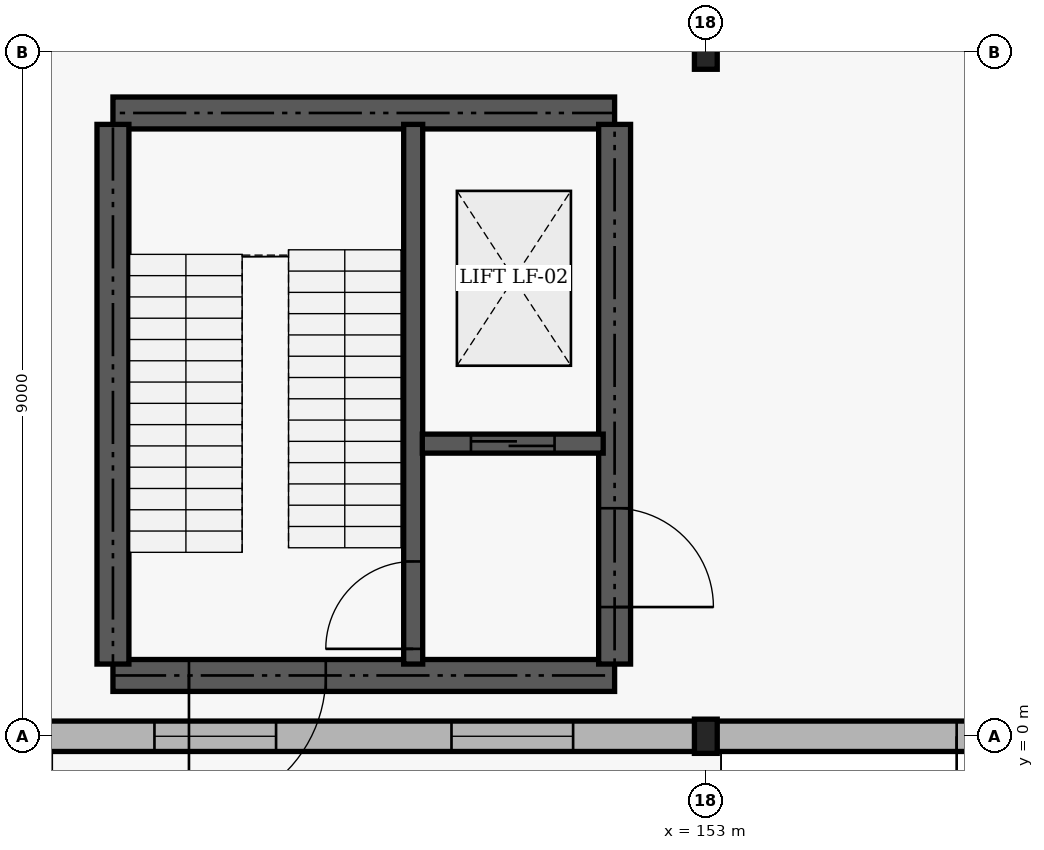
"""IFC4 building model, lengths in metres.
Left out: names, types, materials, properties, quantities, classifications, styles, units other than length and angle.
Written with IfcOpenShell. Run it as: python <this file> out.ifc"""

import sys

from ifc_helpers import new_model, si_unit, direction, frame, frame_2d, origin, origin_2d, place, context, subcontext, project, spatial, rectangle, i_section, extrude, element, fill, save


model = new_model("IFC4")
c1 = context("Model", 3, precision=1e-05, world=origin(), true_north=direction((0.0, 1.0)))
c2 = subcontext(c1, "Body", "Model", "MODEL_VIEW")
j1 = project(units=[si_unit("LENGTHUNIT", "METRE"), si_unit("PLANEANGLEUNIT", "RADIAN")], contexts=[c1])
p1 = place(None, origin())
s1 = spatial("IfcSite", under=j1, at=p1, CompositionType="ELEMENT")
p2 = place(p1, origin())
s2 = spatial("IfcBuilding", under=s1, at=p2, CompositionType="ELEMENT")
p3 = place(p2, origin())
s3 = spatial("IfcBuildingStorey", under=s2, at=p3, CompositionType="ELEMENT", Elevation=0.0)
for number, where, z_axis, x_axis in (
    (1, (153.0, 0.0, 0.0), (0.0, 0.0, 1.0), (1.0, 0.0, 0.0)),
    (2, (153.0, 9.0, 0.0), (0.0, 0.0, 1.0), (1.0, 0.0, 0.0)),
):
    element("IfcColumn", number, at=place(p3, frame(where, z_axis=z_axis, x_axis=x_axis)), inside=s3, PredefinedType="COLUMN", context=c2, shape_type="SweptSolid", body=[
        extrude(i_section(OverallWidth=0.3, OverallDepth=0.45, WebThickness=0.014, FlangeThickness=0.026, FilletRadius=0.027, at=origin_2d()), origin(), (0.0, 0.0, 1.0), 5.4),
    ])
p4 = place(p3, frame((144.06, 0.0, 0.0), z_axis=(0.0, 0.0, 1.0), x_axis=(1.0, 0.0, 0.0)))
e3 = element("IfcWall", 3, at=p4, inside=s3, PredefinedType="SOLIDWALL", context=c2, shape_type="SweptSolid", body=[
    extrude(rectangle(XDim=8.88, YDim=0.4, at=frame_2d((4.44, 0.0))), origin(), (0.0, 0.0, 1.0), 4.7),
])
p5 = place(p4, frame((1.686, 0.0, 0.9)))
e4 = element("IfcOpeningElement", 4, at=p5, cuts=e3, PredefinedType="OPENING", context=c2, shape_type="SweptSolid", body=[
    extrude(rectangle(XDim=1.6, YDim=2.4, at=frame_2d((0.8, 1.2))), frame((0.0, 0.21, 0.0), z_axis=(0.0, -1.0, 0.0), x_axis=(1.0, 0.0, 0.0)), (0.0, 0.0, 1.0), 0.42),
])
p6 = place(p4, frame((5.594, 0.0, 0.9)))
e5 = element("IfcOpeningElement", 5, at=p6, cuts=e3, PredefinedType="OPENING", context=c2, shape_type="SweptSolid", body=[
    extrude(rectangle(XDim=1.6, YDim=2.4, at=frame_2d((0.8, 1.2))), frame((0.0, 0.21, 0.0), z_axis=(0.0, -1.0, 0.0), x_axis=(1.0, 0.0, 0.0)), (0.0, 0.0, 1.0), 0.42),
])
p7 = place(p3, frame((153.06, 0.0, 0.0), z_axis=(0.0, 0.0, 1.0), x_axis=(1.0, 0.0, 0.0)))
e6 = element("IfcWall", 6, at=p7, inside=s3, PredefinedType="SOLIDWALL", context=c2, shape_type="SweptSolid", body=[
    extrude(rectangle(XDim=8.88, YDim=0.4, at=frame_2d((4.44, 0.0))), origin(), (0.0, 0.0, 1.0), 4.7),
])
p8 = place(p7, frame((3.24, 0.0, 0.0)))
e7 = element("IfcOpeningElement", 7, at=p8, cuts=e6, PredefinedType="OPENING", context=c2, shape_type="SweptSolid", body=[
    extrude(rectangle(XDim=2.4, YDim=2.5, at=frame_2d((1.2, 1.25))), frame((0.0, 0.21, 0.0), z_axis=(0.0, -1.0, 0.0), x_axis=(1.0, 0.0, 0.0)), (0.0, 0.0, 1.0), 0.42),
])
p9 = place(p3, frame((145.2, 0.8, 0.0), z_axis=(0.0, 0.0, 1.0), x_axis=(1.0, 0.0, 0.0)))
e8 = element("IfcWall", 8, at=p9, inside=s3, PredefinedType="SHEAR", context=c2, shape_type="SweptSolid", body=[
    extrude(rectangle(XDim=6.6, YDim=0.42, at=frame_2d((3.3, 0.0))), origin(), (0.0, 0.0, 1.0), 5.4),
])
p10 = place(p9, frame((1.0, 0.0, 0.0)))
e9 = element("IfcOpeningElement", 9, at=p10, cuts=e8, PredefinedType="OPENING", context=c2, shape_type="SweptSolid", body=[
    extrude(rectangle(XDim=1.8, YDim=2.15, at=frame_2d((0.9, 1.075))), frame((0.0, 0.22, 0.0), z_axis=(0.0, -1.0, 0.0), x_axis=(1.0, 0.0, 0.0)), (0.0, 0.0, 1.0), 0.44),
])
p11 = place(p3, frame((145.2, 8.2, 0.0), z_axis=(0.0, 0.0, 1.0), x_axis=(1.0, 0.0, 0.0)))
e10 = element("IfcWall", 10, at=p11, inside=s3, PredefinedType="SHEAR", context=c2, shape_type="SweptSolid", body=[
    extrude(rectangle(XDim=6.6, YDim=0.42, at=frame_2d((3.3, 0.0))), origin(), (0.0, 0.0, 1.0), 5.4),
])
p12 = place(p3, frame((145.2, 0.95, 0.0), z_axis=(0.0, 0.0, 1.0), x_axis=(0.0, 1.0, 0.0)))
e11 = element("IfcWall", 11, at=p12, inside=s3, PredefinedType="SHEAR", context=c2, shape_type="SweptSolid", body=[
    extrude(rectangle(XDim=7.1, YDim=0.42, at=frame_2d((3.55, 0.0))), origin(), (0.0, 0.0, 1.0), 5.4),
])
p13 = place(p3, frame((151.8, 0.95, 0.0), z_axis=(0.0, 0.0, 1.0), x_axis=(0.0, 1.0, 0.0)))
e12 = element("IfcWall", 12, at=p13, inside=s3, PredefinedType="SHEAR", context=c2, shape_type="SweptSolid", body=[
    extrude(rectangle(XDim=7.1, YDim=0.42, at=frame_2d((3.55, 0.0))), origin(), (0.0, 0.0, 1.0), 5.4),
])
p14 = place(p13, frame((0.75, 0.0, 0.0)))
e13 = element("IfcOpeningElement", 13, at=p14, cuts=e12, PredefinedType="OPENING", context=c2, shape_type="SweptSolid", body=[
    extrude(rectangle(XDim=1.3, YDim=2.15, at=frame_2d((0.65, 1.075))), frame((0.0, 0.22, 0.0), z_axis=(0.0, -1.0, 0.0), x_axis=(1.0, 0.0, 0.0)), (0.0, 0.0, 1.0), 0.44),
])
p15 = place(p3, frame((149.15, 0.95, 0.0), z_axis=(0.0, 0.0, 1.0), x_axis=(0.0, 1.0, 0.0)))
e14 = element("IfcWall", 14, at=p15, inside=s3, PredefinedType="SHEAR", context=c2, shape_type="SweptSolid", body=[
    extrude(rectangle(XDim=7.1, YDim=0.25, at=frame_2d((3.55, 0.0))), origin(), (0.0, 0.0, 1.0), 5.4),
])
p16 = place(p15, frame((0.2, 0.0, 0.0)))
e15 = element("IfcOpeningElement", 15, at=p16, cuts=e14, PredefinedType="OPENING", context=c2, shape_type="SweptSolid", body=[
    extrude(rectangle(XDim=1.15, YDim=2.15, at=frame_2d((0.575, 1.075))), frame((0.0, 0.135, 0.0), z_axis=(0.0, -1.0, 0.0), x_axis=(1.0, 0.0, 0.0)), (0.0, 0.0, 1.0), 0.27),
])
p17 = place(p3, frame((149.27, 3.85, 0.0), z_axis=(0.0, 0.0, 1.0), x_axis=(1.0, 0.0, 0.0)))
e16 = element("IfcWall", 16, at=p17, inside=s3, PredefinedType="SHEAR", context=c2, shape_type="SweptSolid", body=[
    extrude(rectangle(XDim=2.38, YDim=0.25, at=frame_2d((1.19, 0.0))), origin(), (0.0, 0.0, 1.0), 5.4),
])
p18 = place(p17, frame((0.64, 0.0, 0.0)))
e17 = element("IfcOpeningElement", 17, at=p18, cuts=e16, PredefinedType="OPENING", context=c2, shape_type="SweptSolid", body=[
    extrude(rectangle(XDim=1.1, YDim=2.15, at=frame_2d((0.55, 1.075))), frame((0.0, 0.135, 0.0), z_axis=(0.0, -1.0, 0.0), x_axis=(1.0, 0.0, 0.0)), (0.0, 0.0, 1.0), 0.27),
])
p19 = place(p5, origin())
e18 = element("IfcWindow", 18, at=p19, inside=s3, PartitioningType="SINGLE_PANEL", PredefinedType="WINDOW", context=c2, shape_type="SweptSolid", body=[
    extrude(rectangle(XDim=1.6, YDim=2.4, at=frame_2d((0.8, 1.2))), frame((0.0, 0.03, 0.0), z_axis=(0.0, -1.0, 0.0), x_axis=(1.0, 0.0, 0.0)), (0.0, 0.0, 1.0), 0.06),
])
fill(e4, e18)
p20 = place(p6, origin())
e19 = element("IfcWindow", 19, at=p20, inside=s3, PartitioningType="SINGLE_PANEL", PredefinedType="WINDOW", context=c2, shape_type="SweptSolid", body=[
    extrude(rectangle(XDim=1.6, YDim=2.4, at=frame_2d((0.8, 1.2))), frame((0.0, 0.03, 0.0), z_axis=(0.0, -1.0, 0.0), x_axis=(1.0, 0.0, 0.0)), (0.0, 0.0, 1.0), 0.06),
])
fill(e5, e19)
p21 = place(p8, frame((2.4, 0.0, 0.0), z_axis=(0.0, 0.0, 1.0), x_axis=(-1.0, 0.0, 0.0)))
e20 = element("IfcDoor", 20, at=p21, inside=s3, OperationType="DOUBLE_DOOR_SINGLE_SWING", PredefinedType="DOOR", context=c2, shape_type="SweptSolid", body=[
    extrude(rectangle(XDim=2.4, YDim=2.5, at=frame_2d((1.2, 1.25))), frame((0.0, 0.025, 0.0), z_axis=(0.0, -1.0, 0.0), x_axis=(1.0, 0.0, 0.0)), (0.0, 0.0, 1.0), 0.05),
])
fill(e7, e20)
p22 = place(p14, frame((1.3, 0.0, 0.0), z_axis=(0.0, 0.0, 1.0), x_axis=(-1.0, 0.0, 0.0)))
e21 = element("IfcDoor", 21, at=p22, inside=s3, OperationType="DOUBLE_DOOR_SINGLE_SWING", PredefinedType="DOOR", context=c2, shape_type="SweptSolid", body=[
    extrude(rectangle(XDim=1.3, YDim=2.15, at=frame_2d((0.65, 1.075))), frame((0.0, 0.025, 0.0), z_axis=(0.0, -1.0, 0.0), x_axis=(1.0, 0.0, 0.0)), (0.0, 0.0, 1.0), 0.05),
])
fill(e13, e21)
p23 = place(p16, origin())
e22 = element("IfcDoor", 22, at=p23, inside=s3, OperationType="SINGLE_SWING_LEFT", PredefinedType="DOOR", context=c2, shape_type="SweptSolid", body=[
    extrude(rectangle(XDim=1.15, YDim=2.15, at=frame_2d((0.575, 1.075))), frame((0.0, 0.025, 0.0), z_axis=(0.0, -1.0, 0.0), x_axis=(1.0, 0.0, 0.0)), (0.0, 0.0, 1.0), 0.05),
])
fill(e15, e22)
p24 = place(p10, frame((1.8, 0.0, 0.0), z_axis=(0.0, 0.0, 1.0), x_axis=(-1.0, 0.0, 0.0)))
e23 = element("IfcDoor", 23, at=p24, inside=s3, OperationType="DOUBLE_DOOR_SINGLE_SWING", PredefinedType="DOOR", context=c2, shape_type="SweptSolid", body=[
    extrude(rectangle(XDim=1.8, YDim=2.15, at=frame_2d((0.9, 1.075))), frame((0.0, 0.025, 0.0), z_axis=(0.0, -1.0, 0.0), x_axis=(1.0, 0.0, 0.0)), (0.0, 0.0, 1.0), 0.05),
])
fill(e9, e23)
p25 = place(p18, origin())
e24 = element("IfcDoor", 24, at=p25, inside=s3, OperationType="SLIDING_TO_LEFT", PredefinedType="DOOR", context=c2, shape_type="SweptSolid", body=[
    extrude(rectangle(XDim=1.1, YDim=2.15, at=frame_2d((0.55, 1.075))), frame((0.0, 0.025, 0.0), z_axis=(0.0, -1.0, 0.0), x_axis=(1.0, 0.0, 0.0)), (0.0, 0.0, 1.0), 0.05),
])
fill(e17, e24)
save(model, sys.argv[1])
